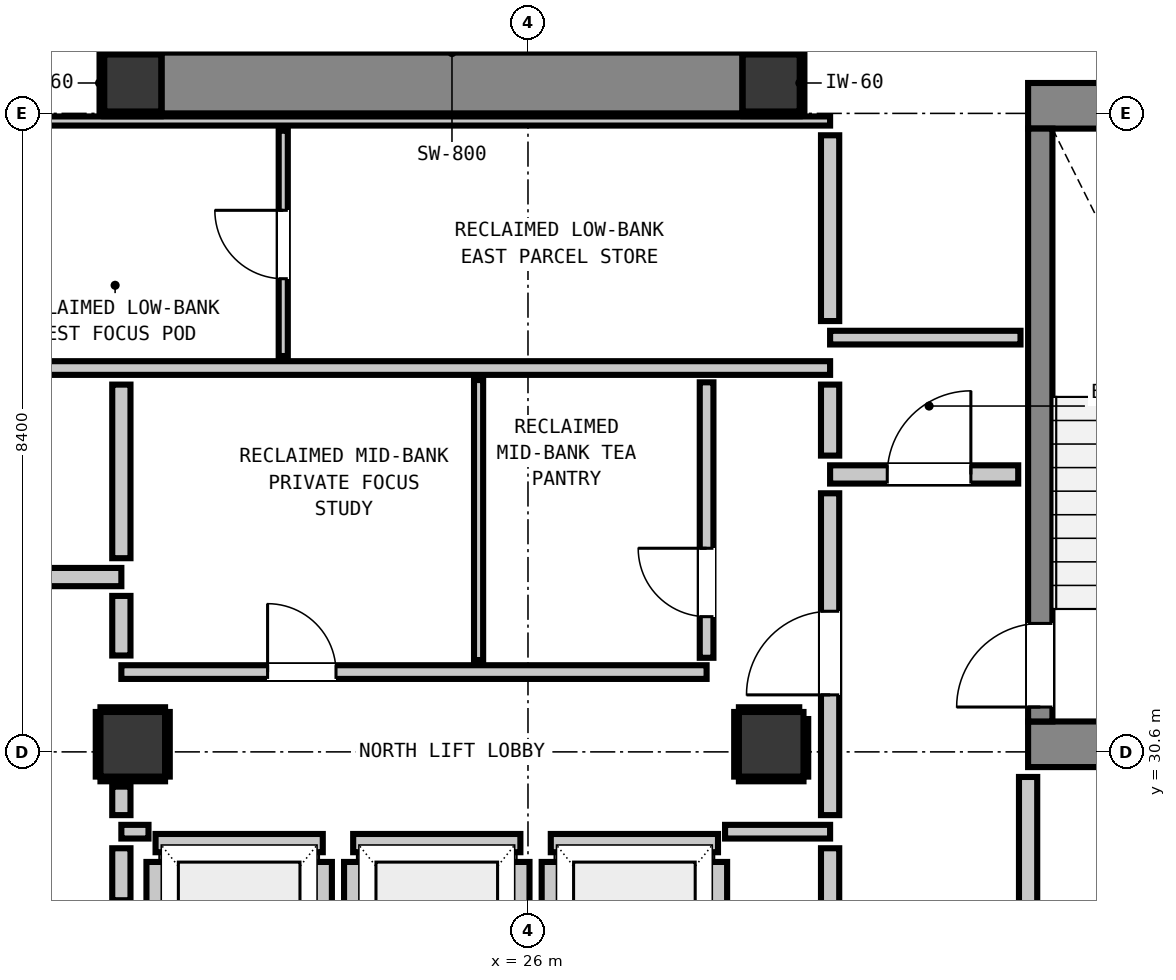
"""IFC4 building model, lengths in metres.
Left out: names, types, materials, properties, quantities, classifications, styles, units other than length and angle.
Written with IfcOpenShell. Run it as: python <this file> out.ifc"""

import sys

from ifc_helpers import new_model, si_unit, direction, frame, frame_2d, origin, origin_2d, place, context, subcontext, project, spatial, rectangle, extrude, element, fill, save


model = new_model("IFC4")
c1 = context("Model", 3, precision=1e-05, world=origin(), true_north=direction((0.0, 1.0)))
c2 = subcontext(c1, "Body", "Model", "MODEL_VIEW")
j1 = project(units=[si_unit("LENGTHUNIT", "METRE"), si_unit("PLANEANGLEUNIT", "RADIAN")], contexts=[c1])
p1 = place(None, origin())
s1 = spatial("IfcSite", under=j1, at=p1, CompositionType="ELEMENT")
p2 = place(p1, origin())
s2 = spatial("IfcBuilding", under=s1, at=p2, CompositionType="ELEMENT")
p3 = place(p2, frame((0.0, 0.0, 254.52)))
s3 = spatial("IfcBuildingStorey", under=s2, at=p3, CompositionType="ELEMENT", Elevation=254.52)
for number, where, z_axis, x_axis in (
    (1, (20.8, 39.4, 0.0), (0.0, 0.0, 1.0), (1.0, 0.0, 0.0)),
    (2, (29.2, 39.4, 0.0), (0.0, 0.0, 1.0), (1.0, 0.0, 0.0)),
):
    element("IfcColumn", number, at=place(p3, frame(where, z_axis=z_axis, x_axis=x_axis)), inside=s3, PredefinedType="COLUMN", context=c2, shape_type="SweptSolid", body=[
        extrude(rectangle(XDim=0.75, YDim=0.75, at=origin_2d()), origin(), (0.0, 0.0, 1.0), 3.32),
    ])
p4 = place(p3, frame((32.58, 39.1, 0.0), z_axis=(0.0, 0.0, 1.0), x_axis=(1.0, 0.0, 0.0)))
e3 = element("IfcWall", 3, at=p4, inside=s3, PredefinedType="SHEAR", context=c2, shape_type="SweptSolid", body=[
    extrude(rectangle(XDim=4.08, YDim=0.6, at=frame_2d((2.04, 0.0))), origin(), (0.0, 0.0, 1.0), 3.32),
])
p5 = place(p3, frame((32.58, 30.7, 0.0), z_axis=(0.0, 0.0, 1.0), x_axis=(1.0, 0.0, 0.0)))
e4 = element("IfcWall", 4, at=p5, inside=s3, PredefinedType="SHEAR", context=c2, shape_type="SweptSolid", body=[
    extrude(rectangle(XDim=3.54, YDim=0.6, at=frame_2d((1.77, 0.0))), origin(), (0.0, 0.0, 1.0), 3.32),
])
p6 = place(p3, frame((21.18, 39.4, 0.0), z_axis=(0.0, 0.0, 1.0), x_axis=(1.0, 0.0, 0.0)))
e5 = element("IfcWall", 5, at=p6, inside=s3, PredefinedType="SHEAR", context=c2, shape_type="SweptSolid", body=[
    extrude(rectangle(XDim=7.64, YDim=0.8, at=frame_2d((3.82, 0.0))), origin(), (0.0, 0.0, 1.0), 3.32),
])
p7 = place(p3, frame((32.74, 31.0, 0.0), z_axis=(0.0, 0.0, 1.0), x_axis=(0.0, 1.0, 0.0)))
e6 = element("IfcWall", 6, at=p7, inside=s3, PredefinedType="SHEAR", context=c2, shape_type="SweptSolid", body=[
    extrude(rectangle(XDim=7.8, YDim=0.32, at=frame_2d((3.9, 0.0))), origin(), (0.0, 0.0, 1.0), 3.32),
])
p8 = place(p7, frame((0.19, 0.0, 0.0)))
e7 = element("IfcOpeningElement", 7, at=p8, cuts=e6, PredefinedType="OPENING", context=c2, shape_type="SweptSolid", body=[
    extrude(rectangle(XDim=1.1, YDim=2.15, at=frame_2d((0.55, 1.075))), frame((0.0, 0.17, 0.0), z_axis=(0.0, -1.0, 0.0), x_axis=(1.0, 0.0, 0.0)), (0.0, 0.0, 1.0), 0.34),
])
for number, where, z_axis, x_axis in (
    (8, (20.8, 30.7, 0.0), (0.0, 0.0, 1.0), (1.0, 0.0, 0.0)),
    (9, (29.2, 30.7, 0.0), (0.0, 0.0, 1.0), (1.0, 0.0, 0.0)),
):
    element("IfcColumn", number, at=place(p3, frame(where, z_axis=z_axis, x_axis=x_axis)), inside=s3, PredefinedType="COLUMN", context=c2, shape_type="SweptSolid", body=[
        extrude(rectangle(XDim=0.85, YDim=0.85, at=origin_2d()), origin(), (0.0, 0.0, 1.0), 3.32),
    ])
p9 = place(p3, frame((21.1, 29.4, 0.0), z_axis=(0.0, 0.0, 1.0), x_axis=(1.0, 0.0, 0.0)))
e10 = element("IfcWall", 10, at=p9, inside=s3, PredefinedType="PARTITIONING", context=c2, shape_type="SweptSolid", body=[
    extrude(rectangle(XDim=2.2, YDim=0.24, at=frame_2d((1.1, 0.0))), origin(), (0.0, 0.0, 1.0), 2.96),
])
p10 = place(p3, frame((21.1, 27.048, 0.0), z_axis=(0.0, 0.0, 1.0), x_axis=(0.0, 1.0, 0.0)))
e11 = element("IfcWall", 11, at=p10, inside=s3, PredefinedType="PARTITIONING", context=c2, shape_type="SweptSolid", body=[
    extrude(rectangle(XDim=2.104, YDim=0.24, at=frame_2d((1.052, 0.0))), origin(), (0.0, 0.0, 1.0), 2.195),
])
p11 = place(p3, frame((23.3, 27.048, 0.0), z_axis=(0.0, 0.0, 1.0), x_axis=(0.0, 1.0, 0.0)))
e12 = element("IfcWall", 12, at=p11, inside=s3, PredefinedType="PARTITIONING", context=c2, shape_type="SweptSolid", body=[
    extrude(rectangle(XDim=2.104, YDim=0.24, at=frame_2d((1.052, 0.0))), origin(), (0.0, 0.0, 1.0), 2.96),
])
p12 = place(p3, frame((23.7, 29.4, 0.0), z_axis=(0.0, 0.0, 1.0), x_axis=(1.0, 0.0, 0.0)))
e13 = element("IfcWall", 13, at=p12, inside=s3, PredefinedType="PARTITIONING", context=c2, shape_type="SweptSolid", body=[
    extrude(rectangle(XDim=2.2, YDim=0.24, at=frame_2d((1.1, 0.0))), origin(), (0.0, 0.0, 1.0), 2.96),
])
for number, where, z_axis, x_axis in (
    (14, (23.7, 27.048, 0.0), (0.0, 0.0, 1.0), (0.0, 1.0, 0.0)),
    (15, (25.9, 27.048, 0.0), (0.0, 0.0, 1.0), (0.0, 1.0, 0.0)),
):
    element("IfcWall", number, at=place(p3, frame(where, z_axis=z_axis, x_axis=x_axis)), inside=s3, PredefinedType="PARTITIONING", context=c2, shape_type="SweptSolid", body=[
        extrude(rectangle(XDim=2.104, YDim=0.24, at=frame_2d((1.052, 0.0))), origin(), (0.0, 0.0, 1.0), 2.96),
    ])
p13 = place(p3, frame((26.3, 29.4, 0.0), z_axis=(0.0, 0.0, 1.0), x_axis=(1.0, 0.0, 0.0)))
e16 = element("IfcWall", 16, at=p13, inside=s3, PredefinedType="PARTITIONING", context=c2, shape_type="SweptSolid", body=[
    extrude(rectangle(XDim=2.2, YDim=0.24, at=frame_2d((1.1, 0.0))), origin(), (0.0, 0.0, 1.0), 2.96),
])
p14 = place(p3, frame((26.3, 27.048, 0.0), z_axis=(0.0, 0.0, 1.0), x_axis=(0.0, 1.0, 0.0)))
e17 = element("IfcWall", 17, at=p14, inside=s3, PredefinedType="PARTITIONING", context=c2, shape_type="SweptSolid", body=[
    extrude(rectangle(XDim=2.104, YDim=0.24, at=frame_2d((1.052, 0.0))), origin(), (0.0, 0.0, 1.0), 2.96),
])
p15 = place(p3, frame((28.5, 27.33, 0.0), z_axis=(0.0, 0.0, 1.0), x_axis=(0.0, 1.0, 0.0)))
e18 = element("IfcWall", 18, at=p15, inside=s3, PredefinedType="PARTITIONING", context=c2, shape_type="SweptSolid", body=[
    extrude(rectangle(XDim=1.822, YDim=0.24, at=frame_2d((0.911, 0.0))), origin(), (0.0, 0.0, 1.0), 2.96),
])
p16 = place(p3, frame((17.45, 32.9, 0.0), z_axis=(0.0, 0.0, 1.0), x_axis=(1.0, 0.0, 0.0)))
e19 = element("IfcWall", 19, at=p16, inside=s3, PredefinedType="PARTITIONING", context=c2, shape_type="SweptSolid", body=[
    extrude(rectangle(XDim=3.2, YDim=0.24, at=frame_2d((1.6, 0.0))), origin(), (0.0, 0.0, 1.0), 2.96),
])
p17 = place(p16, frame((0.159, 0.0, 0.0)))
e20 = element("IfcOpeningElement", 20, at=p17, cuts=e19, PredefinedType="OPENING", context=c2, shape_type="SweptSolid", body=[
    extrude(rectangle(XDim=1.1, YDim=2.15, at=frame_2d((0.55, 1.075))), frame((0.0, 0.13, 0.0), z_axis=(0.0, -1.0, 0.0), x_axis=(1.0, 0.0, 0.0)), (0.0, 0.0, 1.0), 0.26),
])
p18 = place(p3, frame((29.975, 34.25, 0.0), z_axis=(0.0, 0.0, 1.0), x_axis=(1.0, 0.0, 0.0)))
e21 = element("IfcWall", 21, at=p18, inside=s3, PredefinedType="PARTITIONING", context=c2, shape_type="SweptSolid", body=[
    extrude(rectangle(XDim=2.475, YDim=0.24, at=frame_2d((1.237, 0.0))), origin(), (0.0, 0.0, 1.0), 2.96),
])
p19 = place(p18, frame((0.752, 0.0, 0.0)))
e22 = element("IfcOpeningElement", 22, at=p19, cuts=e21, PredefinedType="OPENING", context=c2, shape_type="SweptSolid", body=[
    extrude(rectangle(XDim=1.1, YDim=2.15, at=frame_2d((0.55, 1.075))), frame((0.0, 0.13, 0.0), z_axis=(0.0, -1.0, 0.0), x_axis=(1.0, 0.0, 0.0)), (0.0, 0.0, 1.0), 0.26),
])
p20 = place(p3, frame((20.65, 29.55, 0.0), z_axis=(0.0, 0.0, 1.0), x_axis=(1.0, 0.0, 0.0)))
e23 = element("IfcWall", 23, at=p20, inside=s3, PredefinedType="PARTITIONING", context=c2, shape_type="SweptSolid", body=[
    extrude(rectangle(XDim=0.357, YDim=0.18, at=frame_2d((0.179, 0.0))), origin(), (0.0, 0.0, 1.0), 2.96),
])
p21 = place(p3, frame((28.593, 29.55, 0.0), z_axis=(0.0, 0.0, 1.0), x_axis=(1.0, 0.0, 0.0)))
e24 = element("IfcWall", 24, at=p21, inside=s3, PredefinedType="PARTITIONING", context=c2, shape_type="SweptSolid", body=[
    extrude(rectangle(XDim=1.382, YDim=0.18, at=frame_2d((0.691, 0.0))), origin(), (0.0, 0.0, 1.0), 2.96),
])
p22 = place(p3, frame((20.65, 31.65, 0.0), z_axis=(0.0, 0.0, 1.0), x_axis=(1.0, 0.0, 0.0)))
e25 = element("IfcWall", 25, at=p22, inside=s3, PredefinedType="PARTITIONING", context=c2, shape_type="SweptSolid", body=[
    extrude(rectangle(XDim=7.7, YDim=0.18, at=frame_2d((3.85, 0.0))), origin(), (0.0, 0.0, 1.0), 2.96),
])
p23 = place(p22, frame((1.924, 0.0, 0.0)))
e26 = element("IfcOpeningElement", 26, at=p23, cuts=e25, PredefinedType="OPENING", context=c2, shape_type="SweptSolid", body=[
    extrude(rectangle(XDim=0.9, YDim=2.1, at=frame_2d((0.45, 1.05))), frame((0.0, 0.1, 0.0), z_axis=(0.0, -1.0, 0.0), x_axis=(1.0, 0.0, 0.0)), (0.0, 0.0, 1.0), 0.2),
])
p24 = place(p3, frame((18.95, 35.65, 0.0), z_axis=(0.0, 0.0, 1.0), x_axis=(1.0, 0.0, 0.0)))
e27 = element("IfcWall", 27, at=p24, inside=s3, PredefinedType="PARTITIONING", context=c2, shape_type="SweptSolid", body=[
    extrude(rectangle(XDim=11.025, YDim=0.18, at=frame_2d((5.513, 0.0))), origin(), (0.0, 0.0, 1.0), 2.96),
])
p25 = place(p3, frame((29.975, 36.05, 0.0), z_axis=(0.0, 0.0, 1.0), x_axis=(1.0, 0.0, 0.0)))
e28 = element("IfcWall", 28, at=p25, inside=s3, PredefinedType="PARTITIONING", context=c2, shape_type="SweptSolid", body=[
    extrude(rectangle(XDim=2.505, YDim=0.18, at=frame_2d((1.252, 0.0))), origin(), (0.0, 0.0, 1.0), 2.96),
])
p26 = place(p3, frame((18.95, 38.9, 0.0), z_axis=(0.0, 0.0, 1.0), x_axis=(1.0, 0.0, 0.0)))
e29 = element("IfcWall", 29, at=p26, inside=s3, PredefinedType="PARTITIONING", context=c2, shape_type="SweptSolid", body=[
    extrude(rectangle(XDim=11.025, YDim=0.12, at=frame_2d((5.513, 0.0))), origin(), (0.0, 0.0, 1.0), 2.96),
])
p27 = place(p3, frame((20.65, 28.648, 0.0), z_axis=(0.0, 0.0, 1.0), x_axis=(0.0, 1.0, 0.0)))
e30 = element("IfcWall", 30, at=p27, inside=s3, PredefinedType="PARTITIONING", context=c2, shape_type="SweptSolid", body=[
    extrude(rectangle(XDim=0.684, YDim=0.24, at=frame_2d((0.342, 0.0))), origin(), (0.0, 0.0, 1.0), 2.195),
])
p28 = place(p3, frame((20.65, 29.768, 0.0), z_axis=(0.0, 0.0, 1.0), x_axis=(0.0, 1.0, 0.0)))
e31 = element("IfcWall", 31, at=p28, inside=s3, PredefinedType="PARTITIONING", context=c2, shape_type="SweptSolid", body=[
    extrude(rectangle(XDim=0.375, YDim=0.24, at=frame_2d((0.188, 0.0))), origin(), (0.0, 0.0, 1.0), 2.195),
])
p29 = place(p3, frame((20.65, 31.868, 0.0), z_axis=(0.0, 0.0, 1.0), x_axis=(0.0, 1.0, 0.0)))
e32 = element("IfcWall", 32, at=p29, inside=s3, PredefinedType="PARTITIONING", context=c2, shape_type="SweptSolid", body=[
    extrude(rectangle(XDim=0.784, YDim=0.24, at=frame_2d((0.392, 0.0))), origin(), (0.0, 0.0, 1.0), 2.195),
])
p30 = place(p3, frame((20.65, 33.148, 0.0), z_axis=(0.0, 0.0, 1.0), x_axis=(0.0, 1.0, 0.0)))
e33 = element("IfcWall", 33, at=p30, inside=s3, PredefinedType="PARTITIONING", context=c2, shape_type="SweptSolid", body=[
    extrude(rectangle(XDim=2.284, YDim=0.24, at=frame_2d((1.142, 0.0))), origin(), (0.0, 0.0, 1.0), 2.195),
])
p31 = place(p3, frame((29.975, 25.648, 0.0), z_axis=(0.0, 0.0, 1.0), x_axis=(0.0, 1.0, 0.0)))
e34 = element("IfcWall", 34, at=p31, inside=s3, PredefinedType="PARTITIONING", context=c2, shape_type="SweptSolid", body=[
    extrude(rectangle(XDim=3.684, YDim=0.24, at=frame_2d((1.842, 0.0))), origin(), (0.0, 0.0, 1.0), 2.96),
])
p32 = place(p3, frame((29.975, 29.768, 0.0), z_axis=(0.0, 0.0, 1.0), x_axis=(0.0, 1.0, 0.0)))
e35 = element("IfcWall", 35, at=p32, inside=s3, PredefinedType="PARTITIONING", context=c2, shape_type="SweptSolid", body=[
    extrude(rectangle(XDim=4.234, YDim=0.24, at=frame_2d((2.117, 0.0))), origin(), (0.0, 0.0, 1.0), 2.96),
])
p33 = place(p32, frame((1.582, 0.0, 0.0)))
e36 = element("IfcOpeningElement", 36, at=p33, cuts=e35, PredefinedType="OPENING", context=c2, shape_type="SweptSolid", body=[
    extrude(rectangle(XDim=1.1, YDim=2.15, at=frame_2d((0.55, 1.075))), frame((0.0, 0.13, 0.0), z_axis=(0.0, -1.0, 0.0), x_axis=(1.0, 0.0, 0.0)), (0.0, 0.0, 1.0), 0.26),
])
p34 = place(p3, frame((29.975, 34.498, 0.0), z_axis=(0.0, 0.0, 1.0), x_axis=(0.0, 1.0, 0.0)))
e37 = element("IfcWall", 37, at=p34, inside=s3, PredefinedType="PARTITIONING", context=c2, shape_type="SweptSolid", body=[
    extrude(rectangle(XDim=0.934, YDim=0.24, at=frame_2d((0.467, 0.0))), origin(), (0.0, 0.0, 1.0), 2.96),
])
p35 = place(p3, frame((29.975, 36.268, 0.0), z_axis=(0.0, 0.0, 1.0), x_axis=(0.0, 1.0, 0.0)))
e38 = element("IfcWall", 38, at=p35, inside=s3, PredefinedType="PARTITIONING", context=c2, shape_type="SweptSolid", body=[
    extrude(rectangle(XDim=2.444, YDim=0.24, at=frame_2d((1.222, 0.0))), origin(), (0.0, 0.0, 1.0), 2.96),
])
p36 = place(p3, frame((32.58, 25.648, 0.0), z_axis=(0.0, 0.0, 1.0), x_axis=(0.0, 1.0, 0.0)))
e39 = element("IfcWall", 39, at=p36, inside=s3, PredefinedType="PARTITIONING", context=c2, shape_type="SweptSolid", body=[
    extrude(rectangle(XDim=4.622, YDim=0.24, at=frame_2d((2.311, 0.0))), origin(), (0.0, 0.0, 1.0), 2.96),
])
p37 = place(p3, frame((28.35, 31.838, 0.0), z_axis=(0.0, 0.0, 1.0), x_axis=(0.0, 1.0, 0.0)))
e40 = element("IfcWall", 40, at=p37, inside=s3, PredefinedType="PARTITIONING", context=c2, shape_type="SweptSolid", body=[
    extrude(rectangle(XDim=3.624, YDim=0.18, at=frame_2d((1.812, 0.0))), origin(), (0.0, 0.0, 1.0), 2.96),
])
p38 = place(p37, frame((0.541, 0.0, 0.0)))
e41 = element("IfcOpeningElement", 41, at=p38, cuts=e40, PredefinedType="OPENING", context=c2, shape_type="SweptSolid", body=[
    extrude(rectangle(XDim=0.9, YDim=2.1, at=frame_2d((0.45, 1.05))), frame((0.0, 0.1, 0.0), z_axis=(0.0, -1.0, 0.0), x_axis=(1.0, 0.0, 0.0)), (0.0, 0.0, 1.0), 0.2),
])
p39 = place(p3, frame((22.78, 35.808, 0.0), z_axis=(0.0, 0.0, 1.0), x_axis=(0.0, 1.0, 0.0)))
e42 = element("IfcWall", 42, at=p39, inside=s3, PredefinedType="PARTITIONING", context=c2, shape_type="SweptSolid", body=[
    extrude(rectangle(XDim=2.964, YDim=0.12, at=frame_2d((1.482, 0.0))), origin(), (0.0, 0.0, 1.0), 2.96),
])
p40 = place(p39, frame((1.017, 0.0, 0.0)))
e43 = element("IfcOpeningElement", 43, at=p40, cuts=e42, PredefinedType="OPENING", context=c2, shape_type="SweptSolid", body=[
    extrude(rectangle(XDim=0.9, YDim=2.1, at=frame_2d((0.45, 1.05))), frame((0.0, 0.07, 0.0), z_axis=(0.0, -1.0, 0.0), x_axis=(1.0, 0.0, 0.0)), (0.0, 0.0, 1.0), 0.14),
])
p41 = place(p3, frame((25.35, 31.808, 0.0), z_axis=(0.0, 0.0, 1.0), x_axis=(0.0, 1.0, 0.0)))
e44 = element("IfcWall", 44, at=p41, inside=s3, PredefinedType="PARTITIONING", context=c2, shape_type="SweptSolid", body=[
    extrude(rectangle(XDim=3.684, YDim=0.12, at=frame_2d((1.842, 0.0))), origin(), (0.0, 0.0, 1.0), 2.96),
])
for number, where, z_axis, x_axis in (
    (45, (20.425, 38.993, 0.0), (0.0, 0.0, 1.0), (1.0, 0.0, 0.0)),
    (46, (20.425, 39.807, 0.0), (0.0, 0.0, 1.0), (1.0, 0.0, 0.0)),
):
    element("IfcWall", number, at=place(p3, frame(where, z_axis=z_axis, x_axis=x_axis)), inside=s3, PredefinedType="PARTITIONING", context=c2, shape_type="SweptSolid", body=[
        extrude(rectangle(XDim=0.742, YDim=0.06, at=frame_2d((0.371, 0.0))), origin(), (0.0, 0.0, 1.0), 1.45),
    ])
p42 = place(p3, frame((20.393, 39.025, 0.0), z_axis=(0.0, 0.0, 1.0), x_axis=(0.0, 1.0, 0.0)))
e47 = element("IfcWall", 47, at=p42, inside=s3, PredefinedType="PARTITIONING", context=c2, shape_type="SweptSolid", body=[
    extrude(rectangle(XDim=0.75, YDim=0.06, at=frame_2d((0.375, 0.0))), origin(), (0.0, 0.0, 1.0), 1.45),
])
for number, where, z_axis, x_axis in (
    (48, (28.833, 38.993, 0.0), (0.0, 0.0, 1.0), (1.0, 0.0, 0.0)),
    (49, (28.833, 39.807, 0.0), (0.0, 0.0, 1.0), (1.0, 0.0, 0.0)),
):
    element("IfcWall", number, at=place(p3, frame(where, z_axis=z_axis, x_axis=x_axis)), inside=s3, PredefinedType="PARTITIONING", context=c2, shape_type="SweptSolid", body=[
        extrude(rectangle(XDim=0.742, YDim=0.06, at=frame_2d((0.371, 0.0))), origin(), (0.0, 0.0, 1.0), 1.45),
    ])
p43 = place(p3, frame((29.607, 39.025, 0.0), z_axis=(0.0, 0.0, 1.0), x_axis=(0.0, 1.0, 0.0)))
e50 = element("IfcWall", 50, at=p43, inside=s3, PredefinedType="PARTITIONING", context=c2, shape_type="SweptSolid", body=[
    extrude(rectangle(XDim=0.75, YDim=0.06, at=frame_2d((0.375, 0.0))), origin(), (0.0, 0.0, 1.0), 1.45),
])
for number, where, z_axis, x_axis in (
    (51, (20.375, 30.243, 0.0), (0.0, 0.0, 1.0), (1.0, 0.0, 0.0)),
    (52, (20.375, 31.157, 0.0), (0.0, 0.0, 1.0), (1.0, 0.0, 0.0)),
    (53, (20.343, 30.275, 0.0), (0.0, 0.0, 1.0), (0.0, 1.0, 0.0)),
    (54, (21.257, 30.275, 0.0), (0.0, 0.0, 1.0), (0.0, 1.0, 0.0)),
    (55, (28.775, 30.243, 0.0), (0.0, 0.0, 1.0), (1.0, 0.0, 0.0)),
):
    element("IfcWall", number, at=place(p3, frame(where, z_axis=z_axis, x_axis=x_axis)), inside=s3, PredefinedType="PARTITIONING", context=c2, shape_type="SweptSolid", body=[
        extrude(rectangle(XDim=0.85, YDim=0.06, at=frame_2d((0.425, 0.0))), origin(), (0.0, 0.0, 1.0), 1.45),
    ])
p44 = place(p3, frame((28.775, 31.157, 0.0), z_axis=(0.0, 0.0, 1.0), x_axis=(1.0, 0.0, 0.0)))
e56 = element("IfcWall", 56, at=p44, inside=s3, PredefinedType="PARTITIONING", context=c2, shape_type="SweptSolid", body=[
    extrude(rectangle(XDim=0.794, YDim=0.06, at=frame_2d((0.397, 0.0))), origin(), (0.0, 0.0, 1.0), 1.45),
])
p45 = place(p3, frame((28.743, 30.275, 0.0), z_axis=(0.0, 0.0, 1.0), x_axis=(0.0, 1.0, 0.0)))
e57 = element("IfcWall", 57, at=p45, inside=s3, PredefinedType="PARTITIONING", context=c2, shape_type="SweptSolid", body=[
    extrude(rectangle(XDim=0.85, YDim=0.06, at=frame_2d((0.425, 0.0))), origin(), (0.0, 0.0, 1.0), 1.45),
])
p46 = place(p3, frame((29.657, 30.275, 0.0), z_axis=(0.0, 0.0, 1.0), x_axis=(0.0, 1.0, 0.0)))
e58 = element("IfcWall", 58, at=p46, inside=s3, PredefinedType="PARTITIONING", context=c2, shape_type="SweptSolid", body=[
    extrude(rectangle(XDim=0.757, YDim=0.06, at=frame_2d((0.378, 0.0))), origin(), (0.0, 0.0, 1.0), 1.45),
])
p47 = place(p8, origin())
e59 = element("IfcDoor", 59, at=p47, inside=s3, OperationType="SINGLE_SWING_LEFT", PredefinedType="DOOR", context=c2, shape_type="SweptSolid", body=[
    extrude(rectangle(XDim=1.1, YDim=2.15, at=frame_2d((0.55, 1.075))), frame((0.0, 0.025, 0.0), z_axis=(0.0, -1.0, 0.0), x_axis=(1.0, 0.0, 0.0)), (0.0, 0.0, 1.0), 0.05),
])
fill(e7, e59)
p48 = place(p33, origin())
e60 = element("IfcDoor", 60, at=p48, inside=s3, OperationType="SINGLE_SWING_LEFT", PredefinedType="DOOR", context=c2, shape_type="SweptSolid", body=[
    extrude(rectangle(XDim=1.1, YDim=2.15, at=frame_2d((0.55, 1.075))), frame((0.0, 0.025, 0.0), z_axis=(0.0, -1.0, 0.0), x_axis=(1.0, 0.0, 0.0)), (0.0, 0.0, 1.0), 0.05),
])
fill(e36, e60)
p49 = place(p19, origin())
e61 = element("IfcDoor", 61, at=p49, inside=s3, OperationType="SINGLE_SWING_RIGHT", PredefinedType="DOOR", context=c2, shape_type="SweptSolid", body=[
    extrude(rectangle(XDim=1.1, YDim=2.15, at=frame_2d((0.55, 1.075))), frame((0.0, 0.025, 0.0), z_axis=(0.0, -1.0, 0.0), x_axis=(1.0, 0.0, 0.0)), (0.0, 0.0, 1.0), 0.05),
])
fill(e22, e61)
p50 = place(p40, origin())
e62 = element("IfcDoor", 62, at=p50, inside=s3, OperationType="SINGLE_SWING_RIGHT", PredefinedType="DOOR", context=c2, shape_type="SweptSolid", body=[
    extrude(rectangle(XDim=0.9, YDim=2.1, at=frame_2d((0.45, 1.05))), frame((0.0, 0.025, 0.0), z_axis=(0.0, -1.0, 0.0), x_axis=(1.0, 0.0, 0.0)), (0.0, 0.0, 1.0), 0.05),
])
fill(e43, e62)
p51 = place(p23, origin())
e63 = element("IfcDoor", 63, at=p51, inside=s3, OperationType="SINGLE_SWING_LEFT", PredefinedType="DOOR", context=c2, shape_type="SweptSolid", body=[
    extrude(rectangle(XDim=0.9, YDim=2.1, at=frame_2d((0.45, 1.05))), frame((0.0, 0.025, 0.0), z_axis=(0.0, -1.0, 0.0), x_axis=(1.0, 0.0, 0.0)), (0.0, 0.0, 1.0), 0.05),
])
fill(e26, e63)
p52 = place(p38, origin())
e64 = element("IfcDoor", 64, at=p52, inside=s3, OperationType="SINGLE_SWING_RIGHT", PredefinedType="DOOR", context=c2, shape_type="SweptSolid", body=[
    extrude(rectangle(XDim=0.9, YDim=2.1, at=frame_2d((0.45, 1.05))), frame((0.0, 0.025, 0.0), z_axis=(0.0, -1.0, 0.0), x_axis=(1.0, 0.0, 0.0)), (0.0, 0.0, 1.0), 0.05),
])
fill(e41, e64)
save(model, sys.argv[1])
